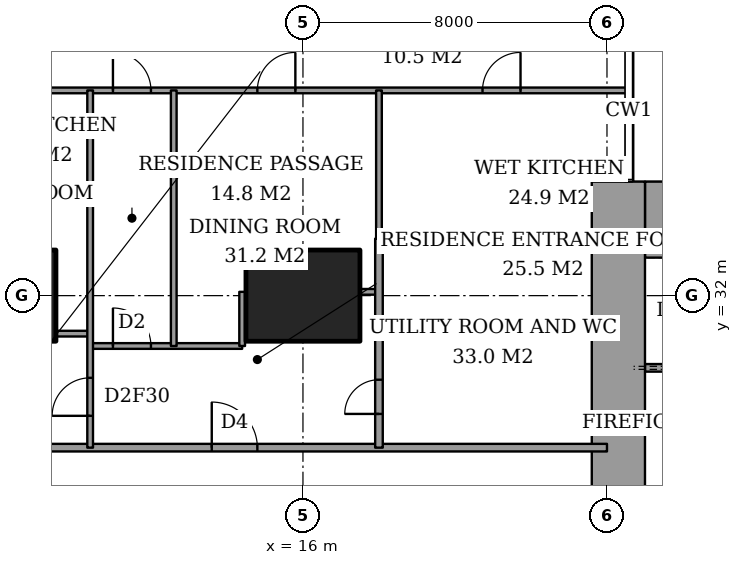
"""IFC4 building model, lengths in metres.
Left out: names, types, materials, properties, quantities, classifications, styles, units other than length and angle.
Written with IfcOpenShell. Run it as: python <this file> out.ifc"""

import sys

from ifc_helpers import new_model, si_unit, direction, frame, frame_2d, origin, origin_2d, place, context, subcontext, project, spatial, rectangle, extrude, element, fill, save


model = new_model("IFC4")
c1 = context("Model", 3, precision=1e-05, world=origin(), true_north=direction((0.0, 1.0)))
c2 = subcontext(c1, "Body", "Model", "MODEL_VIEW")
j1 = project(units=[si_unit("LENGTHUNIT", "METRE"), si_unit("PLANEANGLEUNIT", "RADIAN")], contexts=[c1])
p1 = place(None, origin())
s1 = spatial("IfcSite", under=j1, at=p1, CompositionType="ELEMENT")
p2 = place(p1, origin())
s2 = spatial("IfcBuilding", under=s1, at=p2, CompositionType="ELEMENT")
p3 = place(p2, frame((0.0, 0.0, 161.0)))
s3 = spatial("IfcBuildingStorey", under=s2, at=p3, CompositionType="ELEMENT", Elevation=161.0)
for number, where, z_axis, x_axis in (
    (1, (8.0, 32.0, 0.0), (0.0, 0.0, 1.0), (1.0, 0.0, 0.0)),
    (2, (16.0, 32.0, 0.0), (0.0, 0.0, 1.0), (1.0, 0.0, 0.0)),
):
    element("IfcColumn", number, at=place(p3, frame(where, z_axis=z_axis, x_axis=x_axis)), inside=s3, PredefinedType="COLUMN", context=c2, shape_type="SweptSolid", body=[
        extrude(rectangle(XDim=3.0, YDim=2.4, at=origin_2d()), origin(), (0.0, 0.0, 1.0), 3.6),
    ])
p4 = place(p3, frame((25.0, 34.0, 0.0), z_axis=(0.0, 0.0, 1.0), x_axis=(1.0, 0.0, 0.0)))
e3 = element("IfcWall", 3, at=p4, inside=s3, PredefinedType="SHEAR", context=c2, shape_type="SweptSolid", body=[
    extrude(rectangle(XDim=3.15, YDim=2.0, at=frame_2d((1.575, 0.0))), origin(), (0.0, 0.0, 1.0), 3.6),
])
p5 = place(p3, frame((24.3, 23.15, 0.0), z_axis=(0.0, 0.0, 1.0), x_axis=(0.0, 1.0, 0.0)))
e4 = element("IfcWall", 4, at=p5, inside=s3, PredefinedType="SHEAR", context=c2, shape_type="SweptSolid", body=[
    extrude(rectangle(XDim=11.85, YDim=1.4, at=frame_2d((5.925, 0.0))), origin(), (0.0, 0.0, 1.0), 3.6),
])
p6 = place(p5, frame((0.75, 0.0, 0.0)))
e5 = element("IfcOpeningElement", 5, at=p6, cuts=e4, PredefinedType="OPENING", context=c2, shape_type="SweptSolid", body=[
    extrude(rectangle(XDim=1.8, YDim=2.4, at=frame_2d((0.9, 1.2))), frame((0.0, 0.71, 0.0), z_axis=(0.0, -1.0, 0.0), x_axis=(1.0, 0.0, 0.0)), (0.0, 0.0, 1.0), 1.42),
])
p7 = place(p3, frame((6.725, 28.0, 0.0), z_axis=(0.0, 0.0, 1.0), x_axis=(1.0, 0.0, 0.0)))
e6 = element("IfcWall", 6, at=p7, inside=s3, PredefinedType="PARTITIONING", context=c2, shape_type="SweptSolid", body=[
    extrude(rectangle(XDim=17.275, YDim=0.2, at=frame_2d((8.637, 0.0))), origin(), (0.0, 0.0, 1.0), 3.35),
])
p8 = place(p7, frame((6.875, 0.0, 0.0)))
e7 = element("IfcOpeningElement", 7, at=p8, cuts=e6, PredefinedType="OPENING", context=c2, shape_type="SweptSolid", body=[
    extrude(rectangle(XDim=1.2, YDim=2.4, at=frame_2d((0.6, 1.2))), frame((0.0, 0.11, 0.0), z_axis=(0.0, -1.0, 0.0), x_axis=(1.0, 0.0, 0.0)), (0.0, 0.0, 1.0), 0.22),
])
p9 = place(p3, frame((10.4, 30.675, 0.0), z_axis=(0.0, 0.0, 1.0), x_axis=(1.0, 0.0, 0.0)))
e8 = element("IfcWall", 8, at=p9, inside=s3, PredefinedType="PARTITIONING", context=c2, shape_type="SweptSolid", body=[
    extrude(rectangle(XDim=4.0, YDim=0.15, at=frame_2d((2.0, 0.0))), origin(), (0.0, 0.0, 1.0), 3.35),
])
p10 = place(p9, frame((0.6, 0.0, 0.0)))
e9 = element("IfcOpeningElement", 9, at=p10, cuts=e8, PredefinedType="OPENING", context=c2, shape_type="SweptSolid", body=[
    extrude(rectangle(XDim=1.0, YDim=2.1, at=frame_2d((0.5, 1.05))), frame((0.0, 0.085, 0.0), z_axis=(0.0, -1.0, 0.0), x_axis=(1.0, 0.0, 0.0)), (0.0, 0.0, 1.0), 0.17),
])
p11 = place(p3, frame((9.5, 31.0, 0.0), z_axis=(0.0, 0.0, 1.0), x_axis=(1.0, 0.0, 0.0)))
e10 = element("IfcWall", 10, at=p11, inside=s3, PredefinedType="PARTITIONING", context=c2, shape_type="SweptSolid", body=[
    extrude(rectangle(XDim=0.9, YDim=0.15, at=frame_2d((0.45, 0.0))), origin(), (0.0, 0.0, 1.0), 3.35),
])
p12 = place(p3, frame((17.5, 32.1, 0.0), z_axis=(0.0, 0.0, 1.0), x_axis=(1.0, 0.0, 0.0)))
e11 = element("IfcWall", 11, at=p12, inside=s3, PredefinedType="PARTITIONING", context=c2, shape_type="SweptSolid", body=[
    extrude(rectangle(XDim=0.5, YDim=0.15, at=frame_2d((0.25, 0.0))), origin(), (0.0, 0.0, 1.0), 2.634),
])
p13 = place(p3, frame((18.0, 33.5, 0.0), z_axis=(0.0, 0.0, 1.0), x_axis=(1.0, 0.0, 0.0)))
e12 = element("IfcWall", 12, at=p13, inside=s3, PredefinedType="PARTITIONING", context=c2, shape_type="SweptSolid", body=[
    extrude(rectangle(XDim=6.0, YDim=0.2, at=frame_2d((3.0, 0.0))), origin(), (0.0, 0.0, 1.0), 3.35),
])
p14 = place(p3, frame((-0.45, 37.4, 0.0), z_axis=(0.0, 0.0, 1.0), x_axis=(1.0, 0.0, 0.0)))
e13 = element("IfcWall", 13, at=p14, inside=s3, PredefinedType="PARTITIONING", context=c2, shape_type="SweptSolid", body=[
    extrude(rectangle(XDim=25.011, YDim=0.15, at=frame_2d((12.505, 0.0))), origin(), (0.0, 0.0, 1.0), 3.35),
])
p15 = place(p14, frame((11.45, 0.0, 0.0)))
e14 = element("IfcOpeningElement", 14, at=p15, cuts=e13, PredefinedType="OPENING", context=c2, shape_type="SweptSolid", body=[
    extrude(rectangle(XDim=1.0, YDim=2.1, at=frame_2d((0.5, 1.05))), frame((0.0, 0.085, 0.0), z_axis=(0.0, -1.0, 0.0), x_axis=(1.0, 0.0, 0.0)), (0.0, 0.0, 1.0), 0.17),
])
p16 = place(p14, frame((3.087, 0.0, 0.0)))
e15 = element("IfcOpeningElement", 15, at=p16, cuts=e13, PredefinedType="OPENING", context=c2, shape_type="SweptSolid", body=[
    extrude(rectangle(XDim=1.0, YDim=2.1, at=frame_2d((0.5, 1.05))), frame((0.0, 0.085, 0.0), z_axis=(0.0, -1.0, 0.0), x_axis=(1.0, 0.0, 0.0)), (0.0, 0.0, 1.0), 0.17),
])
p17 = place(p14, frame((8.512, 0.0, 0.0)))
e16 = element("IfcOpeningElement", 16, at=p17, cuts=e13, PredefinedType="OPENING", context=c2, shape_type="SweptSolid", body=[
    extrude(rectangle(XDim=1.0, YDim=2.1, at=frame_2d((0.5, 1.05))), frame((0.0, 0.085, 0.0), z_axis=(0.0, -1.0, 0.0), x_axis=(1.0, 0.0, 0.0)), (0.0, 0.0, 1.0), 0.17),
])
p18 = place(p14, frame((15.25, 0.0, 0.0)))
e17 = element("IfcOpeningElement", 17, at=p18, cuts=e13, PredefinedType="OPENING", context=c2, shape_type="SweptSolid", body=[
    extrude(rectangle(XDim=1.0, YDim=2.1, at=frame_2d((0.5, 1.05))), frame((0.0, 0.085, 0.0), z_axis=(0.0, -1.0, 0.0), x_axis=(1.0, 0.0, 0.0)), (0.0, 0.0, 1.0), 0.17),
])
p19 = place(p14, frame((21.175, 0.0, 0.0)))
e18 = element("IfcOpeningElement", 18, at=p19, cuts=e13, PredefinedType="OPENING", context=c2, shape_type="SweptSolid", body=[
    extrude(rectangle(XDim=1.0, YDim=2.1, at=frame_2d((0.5, 1.05))), frame((0.0, 0.085, 0.0), z_axis=(0.0, -1.0, 0.0), x_axis=(1.0, 0.0, 0.0)), (0.0, 0.0, 1.0), 0.17),
])
p20 = place(p3, frame((10.4, 28.0, 0.0), z_axis=(0.0, 0.0, 1.0), x_axis=(0.0, 1.0, 0.0)))
e19 = element("IfcWall", 19, at=p20, inside=s3, PredefinedType="PARTITIONING", context=c2, shape_type="SweptSolid", body=[
    extrude(rectangle(XDim=9.4, YDim=0.15, at=frame_2d((4.7, 0.0))), origin(), (0.0, 0.0, 1.0), 3.35),
])
p21 = place(p20, frame((0.837, 0.0, 0.0)))
e20 = element("IfcOpeningElement", 20, at=p21, cuts=e19, PredefinedType="OPENING", context=c2, shape_type="SweptSolid", body=[
    extrude(rectangle(XDim=1.0, YDim=2.1, at=frame_2d((0.5, 1.05))), frame((0.0, 0.085, 0.0), z_axis=(0.0, -1.0, 0.0), x_axis=(1.0, 0.0, 0.0)), (0.0, 0.0, 1.0), 0.17),
])
p22 = place(p3, frame((12.6, 30.675, 0.0), z_axis=(0.0, 0.0, 1.0), x_axis=(0.0, 1.0, 0.0)))
e21 = element("IfcWall", 21, at=p22, inside=s3, PredefinedType="PARTITIONING", context=c2, shape_type="SweptSolid", body=[
    extrude(rectangle(XDim=6.725, YDim=0.15, at=frame_2d((3.362, 0.0))), origin(), (0.0, 0.0, 1.0), 3.35),
])
p23 = place(p3, frame((14.4, 30.675, 0.0), z_axis=(0.0, 0.0, 1.0), x_axis=(0.0, 1.0, 0.0)))
e22 = element("IfcWall", 22, at=p23, inside=s3, PredefinedType="PARTITIONING", context=c2, shape_type="SweptSolid", body=[
    extrude(rectangle(XDim=1.425, YDim=0.15, at=frame_2d((0.712, 0.0))), origin(), (0.0, 0.0, 1.0), 3.35),
])
p24 = place(p3, frame((18.0, 28.0, 0.0), z_axis=(0.0, 0.0, 1.0), x_axis=(0.0, 1.0, 0.0)))
e23 = element("IfcWall", 23, at=p24, inside=s3, PredefinedType="PARTITIONING", context=c2, shape_type="SweptSolid", body=[
    extrude(rectangle(XDim=5.5, YDim=0.2, at=frame_2d((2.75, 0.0))), origin(), (0.0, 0.0, 1.0), 3.35),
])
p25 = place(p24, frame((0.887, 0.0, 0.0)))
e24 = element("IfcOpeningElement", 24, at=p25, cuts=e23, PredefinedType="OPENING", context=c2, shape_type="SweptSolid", body=[
    extrude(rectangle(XDim=0.9, YDim=2.1, at=frame_2d((0.45, 1.05))), frame((0.0, 0.11, 0.0), z_axis=(0.0, -1.0, 0.0), x_axis=(1.0, 0.0, 0.0)), (0.0, 0.0, 1.0), 0.22),
])
p26 = place(p3, frame((18.0, 33.5, 0.0), z_axis=(0.0, 0.0, 1.0), x_axis=(0.0, 1.0, 0.0)))
e25 = element("IfcWall", 25, at=p26, inside=s3, PredefinedType="PARTITIONING", context=c2, shape_type="SweptSolid", body=[
    extrude(rectangle(XDim=3.9, YDim=0.15, at=frame_2d((1.95, 0.0))), origin(), (0.0, 0.0, 1.0), 3.35),
])
p27 = place(p3, frame((25.0, 30.1, 0.0), z_axis=(0.0, 0.0, 1.0), x_axis=(1.0, 0.0, 0.0)))
e26 = element("IfcWall", 26, at=p27, inside=s3, PredefinedType="PARTITIONING", context=c2, shape_type="SweptSolid", body=[
    extrude(rectangle(XDim=12.7, YDim=0.2, at=frame_2d((6.35, 0.0))), origin(), (0.0, 0.0, 1.0), 3.6),
])
p28 = place(p27, frame((0.9, 0.0, 0.0)))
e27 = element("IfcOpeningElement", 27, at=p28, cuts=e26, PredefinedType="OPENING", context=c2, shape_type="SweptSolid", body=[
    extrude(rectangle(XDim=1.2, YDim=2.1, at=frame_2d((0.6, 1.05))), frame((0.0, 0.11, 0.0), z_axis=(0.0, -1.0, 0.0), x_axis=(1.0, 0.0, 0.0)), (0.0, 0.0, 1.0), 0.22),
])
p29 = place(p15, origin())
e28 = element("IfcDoor", 28, at=p29, inside=s3, OperationType="SINGLE_SWING_RIGHT", PredefinedType="DOOR", context=c2, shape_type="SweptSolid", body=[
    extrude(rectangle(XDim=1.0, YDim=2.1, at=frame_2d((0.5, 1.05))), frame((0.0, 0.025, 0.0), z_axis=(0.0, -1.0, 0.0), x_axis=(1.0, 0.0, 0.0)), (0.0, 0.0, 1.0), 0.05),
])
fill(e14, e28)
p30 = place(p21, origin())
e29 = element("IfcDoor", 29, at=p30, inside=s3, OperationType="SINGLE_SWING_RIGHT", PredefinedType="DOOR", context=c2, shape_type="SweptSolid", body=[
    extrude(rectangle(XDim=1.0, YDim=2.1, at=frame_2d((0.5, 1.05))), frame((0.0, 0.025, 0.0), z_axis=(0.0, -1.0, 0.0), x_axis=(1.0, 0.0, 0.0)), (0.0, 0.0, 1.0), 0.05),
])
fill(e20, e29)
p31 = place(p8, origin())
e30 = element("IfcDoor", 30, at=p31, inside=s3, OperationType="SINGLE_SWING_RIGHT", PredefinedType="DOOR", context=c2, shape_type="SweptSolid", body=[
    extrude(rectangle(XDim=1.2, YDim=2.4, at=frame_2d((0.6, 1.2))), frame((0.0, 0.025, 0.0), z_axis=(0.0, -1.0, 0.0), x_axis=(1.0, 0.0, 0.0)), (0.0, 0.0, 1.0), 0.05),
])
fill(e7, e30)
p32 = place(p10, origin())
e31 = element("IfcDoor", 31, at=p32, inside=s3, OperationType="SINGLE_SWING_RIGHT", PredefinedType="DOOR", context=c2, shape_type="SweptSolid", body=[
    extrude(rectangle(XDim=1.0, YDim=2.1, at=frame_2d((0.5, 1.05))), frame((0.0, 0.025, 0.0), z_axis=(0.0, -1.0, 0.0), x_axis=(1.0, 0.0, 0.0)), (0.0, 0.0, 1.0), 0.05),
])
fill(e9, e31)
p33 = place(p18, origin())
e32 = element("IfcDoor", 32, at=p33, inside=s3, OperationType="SINGLE_SWING_LEFT", PredefinedType="DOOR", context=c2, shape_type="SweptSolid", body=[
    extrude(rectangle(XDim=1.0, YDim=2.1, at=frame_2d((0.5, 1.05))), frame((0.0, 0.025, 0.0), z_axis=(0.0, -1.0, 0.0), x_axis=(1.0, 0.0, 0.0)), (0.0, 0.0, 1.0), 0.05),
])
fill(e17, e32)
p34 = place(p19, origin())
e33 = element("IfcDoor", 33, at=p34, inside=s3, OperationType="SINGLE_SWING_LEFT", PredefinedType="DOOR", context=c2, shape_type="SweptSolid", body=[
    extrude(rectangle(XDim=1.0, YDim=2.1, at=frame_2d((0.5, 1.05))), frame((0.0, 0.025, 0.0), z_axis=(0.0, -1.0, 0.0), x_axis=(1.0, 0.0, 0.0)), (0.0, 0.0, 1.0), 0.05),
])
fill(e18, e33)
p35 = place(p25, origin())
e34 = element("IfcDoor", 34, at=p35, inside=s3, OperationType="SINGLE_SWING_RIGHT", PredefinedType="DOOR", context=c2, shape_type="SweptSolid", body=[
    extrude(rectangle(XDim=0.9, YDim=2.1, at=frame_2d((0.45, 1.05))), frame((0.0, 0.025, 0.0), z_axis=(0.0, -1.0, 0.0), x_axis=(1.0, 0.0, 0.0)), (0.0, 0.0, 1.0), 0.05),
])
fill(e24, e34)
save(model, sys.argv[1])
